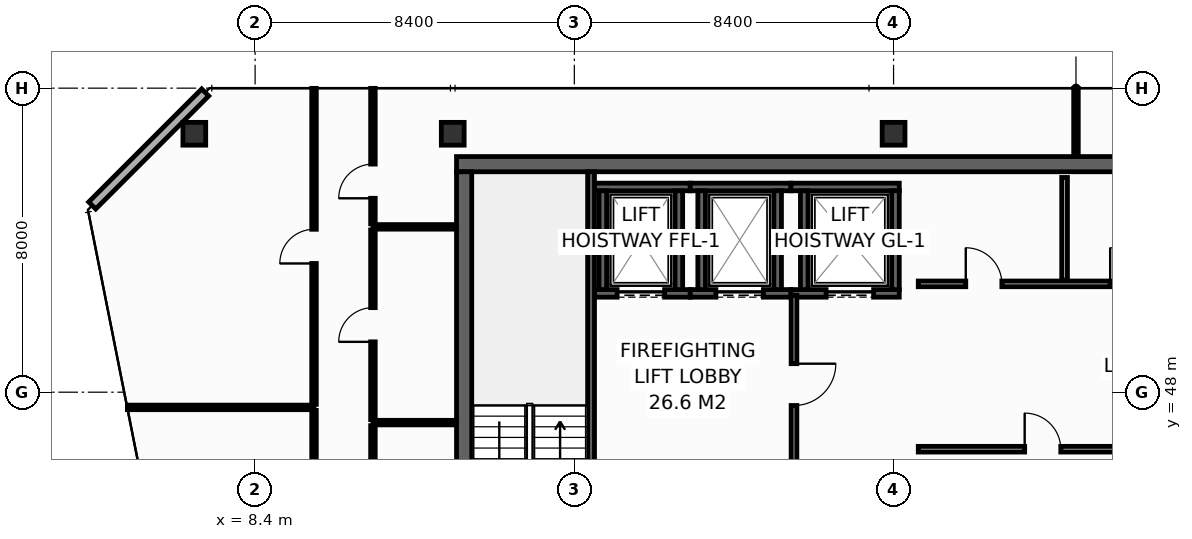
"""IFC4 building model, lengths in metres.
Left out: names, types, materials, properties, quantities, classifications, styles, units other than length and angle.
Written with IfcOpenShell. Run it as: python <this file> out.ifc"""

import sys

from ifc_helpers import new_model, si_unit, direction, frame, frame_2d, origin, origin_2d, place, context, subcontext, project, spatial, rectangle, hollow_rectangle, extrude, element, fill, save


model = new_model("IFC4")
c1 = context("Model", 3, precision=1e-05, world=origin(), true_north=direction((0.0, 1.0)))
c2 = subcontext(c1, "Body", "Model", "MODEL_VIEW")
j1 = project(units=[si_unit("LENGTHUNIT", "METRE"), si_unit("PLANEANGLEUNIT", "RADIAN")], contexts=[c1])
p1 = place(None, origin())
s1 = spatial("IfcSite", under=j1, at=p1, CompositionType="ELEMENT")
p2 = place(p1, origin())
s2 = spatial("IfcBuilding", under=s1, at=p2, CompositionType="ELEMENT")
p3 = place(p2, frame((0.0, 0.0, 306.6)))
s3 = spatial("IfcBuildingStorey", under=s2, at=p3, CompositionType="ELEMENT", Elevation=306.6)
p4 = place(p3, frame((13.7, 54.0, 0.0), z_axis=(0.0, 0.0, 1.0), x_axis=(1.0, 0.0, 0.0)))
e1 = element("IfcWall", 1, at=p4, inside=s3, PredefinedType="SHEAR", context=c2, shape_type="SweptSolid", body=[
    extrude(rectangle(XDim=32.5, YDim=0.4, at=frame_2d((16.25, 0.0))), origin(), (0.0, 0.0, 1.0), 3.55),
])
p5 = place(p3, frame((13.9, 43.4, 0.0), z_axis=(0.0, 0.0, 1.0), x_axis=(0.0, 1.0, 0.0)))
e2 = element("IfcWall", 2, at=p5, inside=s3, PredefinedType="SHEAR", context=c2, shape_type="SweptSolid", body=[
    extrude(rectangle(XDim=10.4, YDim=0.4, at=frame_2d((5.2, 0.0))), origin(), (0.0, 0.0, 1.0), 3.55),
])
for number, where, z_axis, x_axis in (
    (3, (6.8, 54.8, 0.0), (0.0, 0.0, 1.0), (1.0, 0.0, 0.0)),
    (4, (13.6, 54.8, 0.0), (0.0, 0.0, 1.0), (1.0, 0.0, 0.0)),
    (5, (25.2, 54.8, 0.0), (0.0, 0.0, 1.0), (1.0, 0.0, 0.0)),
):
    element("IfcColumn", number, at=place(p3, frame(where, z_axis=z_axis, x_axis=x_axis)), inside=s3, PredefinedType="COLUMN", context=c2, shape_type="SweptSolid", body=[
        extrude(hollow_rectangle(XDim=0.6, YDim=0.6, WallThickness=0.028, at=origin_2d()), origin(), (0.0, 0.0, 1.0), 3.8),
    ])
p6 = place(p3, frame((17.33, 50.6, 0.0), z_axis=(0.0, 0.0, 1.0), x_axis=(1.0, 0.0, 0.0)))
e6 = element("IfcWall", 6, at=p6, inside=s3, PredefinedType="SHEAR", context=c2, shape_type="SweptSolid", body=[
    extrude(rectangle(XDim=2.52, YDim=0.2, at=frame_2d((1.26, 0.0))), origin(), (0.0, 0.0, 1.0), 3.55),
])
p7 = place(p6, frame((0.595, 0.0, 0.0)))
e7 = element("IfcOpeningElement", 7, at=p7, cuts=e6, PredefinedType="OPENING", context=c2, shape_type="SweptSolid", body=[
    extrude(rectangle(XDim=1.25, YDim=2.3, at=frame_2d((0.625, 1.15))), frame((0.0, 0.11, 0.0), z_axis=(0.0, -1.0, 0.0), x_axis=(1.0, 0.0, 0.0)), (0.0, 0.0, 1.0), 0.22),
])
p8 = place(p3, frame((17.33, 53.4, 0.0), z_axis=(0.0, 0.0, 1.0), x_axis=(1.0, 0.0, 0.0)))
e8 = element("IfcWall", 8, at=p8, inside=s3, PredefinedType="SHEAR", context=c2, shape_type="SweptSolid", body=[
    extrude(rectangle(XDim=2.52, YDim=0.2, at=frame_2d((1.26, 0.0))), origin(), (0.0, 0.0, 1.0), 3.55),
])
for number, where, z_axis, x_axis in (
    (9, (17.55, 50.7, 0.0), (0.0, 0.0, 1.0), (0.0, 1.0, 0.0)),
    (10, (19.55, 50.7, 0.0), (0.0, 0.0, 1.0), (0.0, 1.0, 0.0)),
):
    element("IfcWall", number, at=place(p3, frame(where, z_axis=z_axis, x_axis=x_axis)), inside=s3, PredefinedType="SHEAR", context=c2, shape_type="SweptSolid", body=[
        extrude(rectangle(XDim=2.6, YDim=0.2, at=frame_2d((1.3, 0.0))), origin(), (0.0, 0.0, 1.0), 3.55),
    ])
p9 = place(p3, frame((19.85, 50.6, 0.0), z_axis=(0.0, 0.0, 1.0), x_axis=(1.0, 0.0, 0.0)))
e11 = element("IfcWall", 11, at=p9, inside=s3, PredefinedType="SHEAR", context=c2, shape_type="SweptSolid", body=[
    extrude(rectangle(XDim=2.65, YDim=0.2, at=frame_2d((1.325, 0.0))), origin(), (0.0, 0.0, 1.0), 3.55),
])
p10 = place(p9, frame((0.675, 0.0, 0.0)))
e12 = element("IfcOpeningElement", 12, at=p10, cuts=e11, PredefinedType="OPENING", context=c2, shape_type="SweptSolid", body=[
    extrude(rectangle(XDim=1.25, YDim=2.3, at=frame_2d((0.625, 1.15))), frame((0.0, 0.11, 0.0), z_axis=(0.0, -1.0, 0.0), x_axis=(1.0, 0.0, 0.0)), (0.0, 0.0, 1.0), 0.22),
])
p11 = place(p3, frame((19.85, 53.4, 0.0), z_axis=(0.0, 0.0, 1.0), x_axis=(1.0, 0.0, 0.0)))
e13 = element("IfcWall", 13, at=p11, inside=s3, PredefinedType="SHEAR", context=c2, shape_type="SweptSolid", body=[
    extrude(rectangle(XDim=2.65, YDim=0.2, at=frame_2d((1.325, 0.0))), origin(), (0.0, 0.0, 1.0), 3.55),
])
for number, where, z_axis, x_axis in (
    (14, (20.15, 50.7, 0.0), (0.0, 0.0, 1.0), (0.0, 1.0, 0.0)),
    (15, (22.15, 50.7, 0.0), (0.0, 0.0, 1.0), (0.0, 1.0, 0.0)),
):
    element("IfcWall", number, at=place(p3, frame(where, z_axis=z_axis, x_axis=x_axis)), inside=s3, PredefinedType="SHEAR", context=c2, shape_type="SweptSolid", body=[
        extrude(rectangle(XDim=2.6, YDim=0.2, at=frame_2d((1.3, 0.0))), origin(), (0.0, 0.0, 1.0), 3.55),
    ])
p12 = place(p3, frame((22.5, 50.6, 0.0), z_axis=(0.0, 0.0, 1.0), x_axis=(1.0, 0.0, 0.0)))
e16 = element("IfcWall", 16, at=p12, inside=s3, PredefinedType="SHEAR", context=c2, shape_type="SweptSolid", body=[
    extrude(rectangle(XDim=2.85, YDim=0.2, at=frame_2d((1.425, 0.0))), origin(), (0.0, 0.0, 1.0), 3.55),
])
p13 = place(p12, frame((0.925, 0.0, 0.0)))
e17 = element("IfcOpeningElement", 17, at=p13, cuts=e16, PredefinedType="OPENING", context=c2, shape_type="SweptSolid", body=[
    extrude(rectangle(XDim=1.25, YDim=2.3, at=frame_2d((0.625, 1.15))), frame((0.0, 0.11, 0.0), z_axis=(0.0, -1.0, 0.0), x_axis=(1.0, 0.0, 0.0)), (0.0, 0.0, 1.0), 0.22),
])
p14 = place(p3, frame((22.5, 53.4, 0.0), z_axis=(0.0, 0.0, 1.0), x_axis=(1.0, 0.0, 0.0)))
e18 = element("IfcWall", 18, at=p14, inside=s3, PredefinedType="SHEAR", context=c2, shape_type="SweptSolid", body=[
    extrude(rectangle(XDim=2.85, YDim=0.2, at=frame_2d((1.425, 0.0))), origin(), (0.0, 0.0, 1.0), 3.55),
])
for number, where, z_axis, x_axis in (
    (19, (22.85, 50.7, 0.0), (0.0, 0.0, 1.0), (0.0, 1.0, 0.0)),
    (20, (25.25, 50.7, 0.0), (0.0, 0.0, 1.0), (0.0, 1.0, 0.0)),
):
    element("IfcWall", number, at=place(p3, frame(where, z_axis=z_axis, x_axis=x_axis)), inside=s3, PredefinedType="SHEAR", context=c2, shape_type="SweptSolid", body=[
        extrude(rectangle(XDim=2.6, YDim=0.2, at=frame_2d((1.3, 0.0))), origin(), (0.0, 0.0, 1.0), 3.55),
    ])
p15 = place(p3, frame((17.24, 43.4, 0.0), z_axis=(0.0, 0.0, 1.0), x_axis=(0.0, 1.0, 0.0)))
e21 = element("IfcWall", 21, at=p15, inside=s3, PredefinedType="SHEAR", context=c2, shape_type="SweptSolid", body=[
    extrude(rectangle(XDim=10.4, YDim=0.18, at=frame_2d((5.2, 0.0))), origin(), (0.0, 0.0, 1.0), 3.55),
])
p16 = place(p15, frame((0.16, 0.0, 0.0)))
e22 = element("IfcOpeningElement", 22, at=p16, cuts=e21, PredefinedType="OPENING", context=c2, shape_type="SweptSolid", body=[
    extrude(rectangle(XDim=1.0, YDim=2.15, at=frame_2d((0.5, 1.075))), frame((0.0, 0.1, 0.0), z_axis=(0.0, -1.0, 0.0), x_axis=(1.0, 0.0, 0.0)), (0.0, 0.0, 1.0), 0.2),
])
p17 = place(p3, frame((22.58, 50.55, 0.0), z_axis=(0.0, 0.0, 1.0), x_axis=(0.0, -1.0, 0.0)))
e23 = element("IfcWall", 23, at=p17, inside=s3, PredefinedType="PARTITIONING", context=c2, shape_type="SweptSolid", body=[
    extrude(rectangle(XDim=5.33, YDim=0.15, at=frame_2d((2.665, 0.0))), origin(), (0.0, 0.0, 1.0), 3.55),
])
p18 = place(p17, frame((1.8, 0.0, 0.0)))
e24 = element("IfcOpeningElement", 24, at=p18, cuts=e23, PredefinedType="OPENING", context=c2, shape_type="SweptSolid", body=[
    extrude(rectangle(XDim=1.1, YDim=2.15, at=frame_2d((0.55, 1.075))), frame((0.0, 0.085, 0.0), z_axis=(0.0, -1.0, 0.0), x_axis=(1.0, 0.0, 0.0)), (0.0, 0.0, 1.0), 0.17),
])
p19 = place(p3, frame((25.85, 50.85, 0.0), z_axis=(0.0, 0.0, 1.0), x_axis=(1.0, 0.0, 0.0)))
e25 = element("IfcWall", 25, at=p19, inside=s3, PredefinedType="PARTITIONING", context=c2, shape_type="SweptSolid", body=[
    extrude(rectangle(XDim=7.65, YDim=0.15, at=frame_2d((3.825, 0.0))), origin(), (0.0, 0.0, 1.0), 3.55),
])
p20 = place(p19, frame((1.25, 0.0, 0.0)))
e26 = element("IfcOpeningElement", 26, at=p20, cuts=e25, PredefinedType="OPENING", context=c2, shape_type="SweptSolid", body=[
    extrude(rectangle(XDim=0.95, YDim=2.15, at=frame_2d((0.475, 1.075))), frame((0.0, 0.085, 0.0), z_axis=(0.0, -1.0, 0.0), x_axis=(1.0, 0.0, 0.0)), (0.0, 0.0, 1.0), 0.17),
])
p21 = place(p19, frame((5.05, 0.0, 0.0)))
e27 = element("IfcOpeningElement", 27, at=p21, cuts=e25, PredefinedType="OPENING", context=c2, shape_type="SweptSolid", body=[
    extrude(rectangle(XDim=0.95, YDim=2.15, at=frame_2d((0.475, 1.075))), frame((0.0, 0.085, 0.0), z_axis=(0.0, -1.0, 0.0), x_axis=(1.0, 0.0, 0.0)), (0.0, 0.0, 1.0), 0.17),
])
p22 = place(p3, frame((29.7, 50.95, 0.0), z_axis=(0.0, 0.0, 1.0), x_axis=(0.0, 1.0, 0.0)))
e28 = element("IfcWall", 28, at=p22, inside=s3, PredefinedType="PARTITIONING", context=c2, shape_type="SweptSolid", body=[
    extrude(rectangle(XDim=2.7, YDim=0.15, at=frame_2d((1.35, 0.0))), origin(), (0.0, 0.0, 1.0), 3.55),
])
p23 = place(p3, frame((25.85, 46.5, 0.0), z_axis=(0.0, 0.0, 1.0), x_axis=(1.0, 0.0, 0.0)))
e29 = element("IfcWall", 29, at=p23, inside=s3, PredefinedType="PARTITIONING", context=c2, shape_type="SweptSolid", body=[
    extrude(rectangle(XDim=7.65, YDim=0.15, at=frame_2d((3.825, 0.0))), origin(), (0.0, 0.0, 1.0), 3.55),
])
p24 = place(p23, frame((2.8, 0.0, 0.0)))
e30 = element("IfcOpeningElement", 30, at=p24, cuts=e29, PredefinedType="OPENING", context=c2, shape_type="SweptSolid", body=[
    extrude(rectangle(XDim=0.95, YDim=2.15, at=frame_2d((0.475, 1.075))), frame((0.0, 0.085, 0.0), z_axis=(0.0, -1.0, 0.0), x_axis=(1.0, 0.0, 0.0)), (0.0, 0.0, 1.0), 0.17),
])
p25 = place(p3, frame((7.087, 55.887, 0.0), z_axis=(0.0, 0.0, 1.0), x_axis=(-0.707106781187, -0.707106781187, 0.0)))
e31 = element("IfcWall", 31, at=p25, inside=s3, PredefinedType="STANDARD", context=c2, shape_type="SweptSolid", body=[
    extrude(rectangle(XDim=4.206, YDim=0.26, at=frame_2d((2.103, 0.0))), origin(), (0.0, 0.0, 1.0), 3.55),
])
p26 = place(p3, frame((11.5, 52.35, 0.0), z_axis=(0.0, 0.0, 1.0), x_axis=(1.0, 0.0, 0.0)))
e32 = element("IfcWall", 32, at=p26, inside=s3, PredefinedType="PARTITIONING", context=c2, shape_type="SweptSolid", body=[
    extrude(rectangle(XDim=2.18, YDim=0.12, at=frame_2d((1.09, 0.0))), origin(), (0.0, 0.0, 1.0), 3.55),
])
p27 = place(p3, frame((30.0, 54.22, 0.0), z_axis=(0.0, 0.0, 1.0), x_axis=(0.0, 1.0, 0.0)))
e33 = element("IfcWall", 33, at=p27, inside=s3, PredefinedType="PARTITIONING", context=c2, shape_type="SweptSolid", body=[
    extrude(rectangle(XDim=1.775, YDim=0.12, at=frame_2d((0.888, 0.0))), origin(), (0.0, 0.0, 1.0), 2.935),
])
p28 = place(p3, frame((11.5, 52.43, 0.0), z_axis=(0.0, 0.0, 1.0), x_axis=(0.0, 1.0, 0.0)))
e34 = element("IfcWall", 34, at=p28, inside=s3, PredefinedType="PARTITIONING", context=c2, shape_type="SweptSolid", body=[
    extrude(rectangle(XDim=3.565, YDim=0.12, at=frame_2d((1.783, 0.0))), origin(), (0.0, 0.0, 1.0), 2.935),
])
p29 = place(p28, frame((0.672, 0.0, 0.0)))
e35 = element("IfcOpeningElement", 35, at=p29, cuts=e34, PredefinedType="OPENING", context=c2, shape_type="SweptSolid", body=[
    extrude(rectangle(XDim=0.9, YDim=2.1, at=frame_2d((0.45, 1.05))), frame((0.0, 0.07, 0.0), z_axis=(0.0, -1.0, 0.0), x_axis=(1.0, 0.0, 0.0)), (0.0, 0.0, 1.0), 0.14),
])
p30 = place(p3, frame((5.039, 47.6, 0.0), z_axis=(0.0, 0.0, 1.0), x_axis=(1.0, 0.0, 0.0)))
e36 = element("IfcWall", 36, at=p30, inside=s3, PredefinedType="PARTITIONING", context=c2, shape_type="SweptSolid", body=[
    extrude(rectangle(XDim=4.911, YDim=0.12, at=frame_2d((2.456, 0.0))), origin(), (0.0, 0.0, 1.0), 2.947),
])
p31 = place(p3, frame((9.95, 42.02, 0.0), z_axis=(0.0, 0.0, 1.0), x_axis=(0.0, 1.0, 0.0)))
e37 = element("IfcWall", 37, at=p31, inside=s3, PredefinedType="PARTITIONING", context=c2, shape_type="SweptSolid", body=[
    extrude(rectangle(XDim=5.5, YDim=0.12, at=frame_2d((2.75, 0.0))), origin(), (0.0, 0.0, 1.0), 2.947),
])
p32 = place(p31, frame((2.3, 0.0, 0.0)))
e38 = element("IfcOpeningElement", 38, at=p32, cuts=e37, PredefinedType="OPENING", context=c2, shape_type="SweptSolid", body=[
    extrude(rectangle(XDim=0.9, YDim=2.1, at=frame_2d((0.45, 1.05))), frame((0.0, 0.07, 0.0), z_axis=(0.0, -1.0, 0.0), x_axis=(1.0, 0.0, 0.0)), (0.0, 0.0, 1.0), 0.14),
])
p33 = place(p3, frame((9.95, 47.68, 0.0), z_axis=(0.0, 0.0, 1.0), x_axis=(0.0, 1.0, 0.0)))
e39 = element("IfcWall", 39, at=p33, inside=s3, PredefinedType="PARTITIONING", context=c2, shape_type="SweptSolid", body=[
    extrude(rectangle(XDim=8.315, YDim=0.12, at=frame_2d((4.158, 0.0))), origin(), (0.0, 0.0, 1.0), 2.935),
])
p34 = place(p33, frame((3.707, 0.0, 0.0)))
e40 = element("IfcOpeningElement", 40, at=p34, cuts=e39, PredefinedType="OPENING", context=c2, shape_type="SweptSolid", body=[
    extrude(rectangle(XDim=0.9, YDim=2.1, at=frame_2d((0.45, 1.05))), frame((0.0, 0.07, 0.0), z_axis=(0.0, -1.0, 0.0), x_axis=(1.0, 0.0, 0.0)), (0.0, 0.0, 1.0), 0.14),
])
p35 = place(p3, frame((11.5, 47.2, 0.0), z_axis=(0.0, 0.0, 1.0), x_axis=(1.0, 0.0, 0.0)))
e41 = element("IfcWall", 41, at=p35, inside=s3, PredefinedType="PARTITIONING", context=c2, shape_type="SweptSolid", body=[
    extrude(rectangle(XDim=2.18, YDim=0.12, at=frame_2d((1.09, 0.0))), origin(), (0.0, 0.0, 1.0), 3.55),
])
p36 = place(p3, frame((11.5, 42.02, 0.0), z_axis=(0.0, 0.0, 1.0), x_axis=(0.0, 1.0, 0.0)))
e42 = element("IfcWall", 42, at=p36, inside=s3, PredefinedType="PARTITIONING", context=c2, shape_type="SweptSolid", body=[
    extrude(rectangle(XDim=5.1, YDim=0.12, at=frame_2d((2.55, 0.0))), origin(), (0.0, 0.0, 1.0), 2.947),
])
p37 = place(p36, frame((2.1, 0.0, 0.0)))
e43 = element("IfcOpeningElement", 43, at=p37, cuts=e42, PredefinedType="OPENING", context=c2, shape_type="SweptSolid", body=[
    extrude(rectangle(XDim=0.9, YDim=2.1, at=frame_2d((0.45, 1.05))), frame((0.0, 0.07, 0.0), z_axis=(0.0, -1.0, 0.0), x_axis=(1.0, 0.0, 0.0)), (0.0, 0.0, 1.0), 0.14),
])
p38 = place(p3, frame((11.5, 47.28, 0.0), z_axis=(0.0, 0.0, 1.0), x_axis=(0.0, 1.0, 0.0)))
e44 = element("IfcWall", 44, at=p38, inside=s3, PredefinedType="PARTITIONING", context=c2, shape_type="SweptSolid", body=[
    extrude(rectangle(XDim=4.99, YDim=0.12, at=frame_2d((2.495, 0.0))), origin(), (0.0, 0.0, 1.0), 3.55),
])
p39 = place(p38, frame((2.045, 0.0, 0.0)))
e45 = element("IfcOpeningElement", 45, at=p39, cuts=e44, PredefinedType="OPENING", context=c2, shape_type="SweptSolid", body=[
    extrude(rectangle(XDim=0.9, YDim=2.1, at=frame_2d((0.45, 1.05))), frame((0.0, 0.07, 0.0), z_axis=(0.0, -1.0, 0.0), x_axis=(1.0, 0.0, 0.0)), (0.0, 0.0, 1.0), 0.14),
])
p40 = place(p7, origin())
e46 = element("IfcDoor", 46, at=p40, inside=s3, OperationType="SLIDING_TO_LEFT", PredefinedType="DOOR", context=c2, shape_type="SweptSolid", body=[
    extrude(rectangle(XDim=1.25, YDim=2.3, at=frame_2d((0.625, 1.15))), frame((0.0, 0.025, 0.0), z_axis=(0.0, -1.0, 0.0), x_axis=(1.0, 0.0, 0.0)), (0.0, 0.0, 1.0), 0.05),
])
fill(e7, e46)
p41 = place(p10, origin())
e47 = element("IfcDoor", 47, at=p41, inside=s3, OperationType="SLIDING_TO_LEFT", PredefinedType="DOOR", context=c2, shape_type="SweptSolid", body=[
    extrude(rectangle(XDim=1.25, YDim=2.3, at=frame_2d((0.625, 1.15))), frame((0.0, 0.025, 0.0), z_axis=(0.0, -1.0, 0.0), x_axis=(1.0, 0.0, 0.0)), (0.0, 0.0, 1.0), 0.05),
])
fill(e12, e47)
p42 = place(p13, origin())
e48 = element("IfcDoor", 48, at=p42, inside=s3, OperationType="SLIDING_TO_LEFT", PredefinedType="DOOR", context=c2, shape_type="SweptSolid", body=[
    extrude(rectangle(XDim=1.25, YDim=2.3, at=frame_2d((0.625, 1.15))), frame((0.0, 0.025, 0.0), z_axis=(0.0, -1.0, 0.0), x_axis=(1.0, 0.0, 0.0)), (0.0, 0.0, 1.0), 0.05),
])
fill(e17, e48)
p43 = place(p18, origin())
e49 = element("IfcDoor", 49, at=p43, inside=s3, OperationType="SINGLE_SWING_LEFT", PredefinedType="DOOR", context=c2, shape_type="SweptSolid", body=[
    extrude(rectangle(XDim=1.1, YDim=2.15, at=frame_2d((0.55, 1.075))), frame((0.0, 0.025, 0.0), z_axis=(0.0, -1.0, 0.0), x_axis=(1.0, 0.0, 0.0)), (0.0, 0.0, 1.0), 0.05),
])
fill(e24, e49)
p44 = place(p20, origin())
e50 = element("IfcDoor", 50, at=p44, inside=s3, OperationType="SINGLE_SWING_LEFT", PredefinedType="DOOR", context=c2, shape_type="SweptSolid", body=[
    extrude(rectangle(XDim=0.95, YDim=2.15, at=frame_2d((0.475, 1.075))), frame((0.0, 0.025, 0.0), z_axis=(0.0, -1.0, 0.0), x_axis=(1.0, 0.0, 0.0)), (0.0, 0.0, 1.0), 0.05),
])
fill(e26, e50)
p45 = place(p21, origin())
e51 = element("IfcDoor", 51, at=p45, inside=s3, OperationType="SINGLE_SWING_LEFT", PredefinedType="DOOR", context=c2, shape_type="SweptSolid", body=[
    extrude(rectangle(XDim=0.95, YDim=2.15, at=frame_2d((0.475, 1.075))), frame((0.0, 0.025, 0.0), z_axis=(0.0, -1.0, 0.0), x_axis=(1.0, 0.0, 0.0)), (0.0, 0.0, 1.0), 0.05),
])
fill(e27, e51)
p46 = place(p24, origin())
e52 = element("IfcDoor", 52, at=p46, inside=s3, OperationType="SINGLE_SWING_LEFT", PredefinedType="DOOR", context=c2, shape_type="SweptSolid", body=[
    extrude(rectangle(XDim=0.95, YDim=2.15, at=frame_2d((0.475, 1.075))), frame((0.0, 0.025, 0.0), z_axis=(0.0, -1.0, 0.0), x_axis=(1.0, 0.0, 0.0)), (0.0, 0.0, 1.0), 0.05),
])
fill(e30, e52)
p47 = place(p29, origin())
e53 = element("IfcDoor", 53, at=p47, inside=s3, OperationType="SINGLE_SWING_LEFT", PredefinedType="DOOR", context=c2, shape_type="SweptSolid", body=[
    extrude(rectangle(XDim=0.9, YDim=2.1, at=frame_2d((0.45, 1.05))), frame((0.0, 0.025, 0.0), z_axis=(0.0, -1.0, 0.0), x_axis=(1.0, 0.0, 0.0)), (0.0, 0.0, 1.0), 0.05),
])
fill(e35, e53)
p48 = place(p34, origin())
e54 = element("IfcDoor", 54, at=p48, inside=s3, OperationType="SINGLE_SWING_LEFT", PredefinedType="DOOR", context=c2, shape_type="SweptSolid", body=[
    extrude(rectangle(XDim=0.9, YDim=2.1, at=frame_2d((0.45, 1.05))), frame((0.0, 0.025, 0.0), z_axis=(0.0, -1.0, 0.0), x_axis=(1.0, 0.0, 0.0)), (0.0, 0.0, 1.0), 0.05),
])
fill(e40, e54)
p49 = place(p39, origin())
e55 = element("IfcDoor", 55, at=p49, inside=s3, OperationType="SINGLE_SWING_LEFT", PredefinedType="DOOR", context=c2, shape_type="SweptSolid", body=[
    extrude(rectangle(XDim=0.9, YDim=2.1, at=frame_2d((0.45, 1.05))), frame((0.0, 0.025, 0.0), z_axis=(0.0, -1.0, 0.0), x_axis=(1.0, 0.0, 0.0)), (0.0, 0.0, 1.0), 0.05),
])
fill(e45, e55)
save(model, sys.argv[1])
